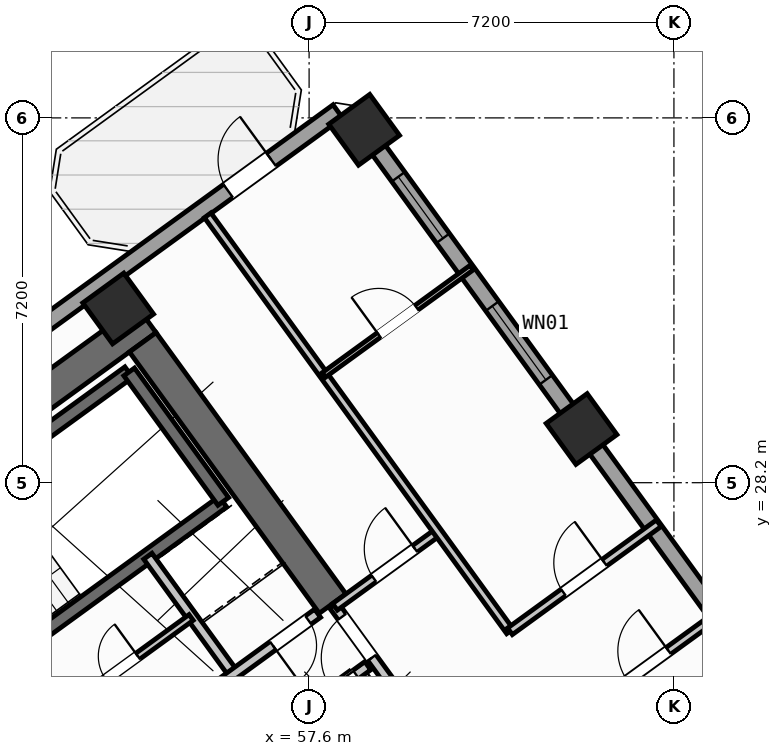
"""IFC4 building model, lengths in metres.
Left out: names, types, materials, properties, quantities, classifications, styles, units other than length and angle.
Written with IfcOpenShell. Run it as: python <this file> out.ifc"""

import sys

from ifc_helpers import new_model, si_unit, direction, frame, frame_2d, origin, origin_2d, place, context, subcontext, project, spatial, rectangle, hollow_rectangle, extrude, source, transform, mapped, element, fill, save


model = new_model("IFC4")
c1 = context("Model", 3, precision=1e-05, world=origin(), true_north=direction((0.0, 1.0)))
c2 = subcontext(c1, "Body", "Model", "MODEL_VIEW")
j1 = project(units=[si_unit("LENGTHUNIT", "METRE"), si_unit("PLANEANGLEUNIT", "RADIAN")], contexts=[c1])
p1 = place(None, origin())
s1 = spatial("IfcSite", under=j1, at=p1, CompositionType="ELEMENT")
p2 = place(p1, origin())
s2 = spatial("IfcBuilding", under=s1, at=p2, CompositionType="ELEMENT")
p3 = place(p2, frame((0.0, 0.0, 60.0)))
s3 = spatial("IfcBuildingStorey", under=s2, at=p3, CompositionType="ELEMENT", Elevation=60.0)
p4 = place(p3, frame((44.325, 24.113, 0.0), z_axis=(0.0, 0.0, 1.0), x_axis=(0.809012664862, 0.58779121131, 0.0)))
e1 = element("IfcWall", 1, at=p4, inside=s3, PredefinedType="SHEAR", context=c2, shape_type="SweptSolid", body=[
    extrude(rectangle(XDim=12.44, YDim=0.65, at=frame_2d((6.22, 0.0))), origin(), (0.0, 0.0, 1.0), 3.35),
])
p5 = place(p3, frame((58.064, 25.813, 0.0), z_axis=(0.0, 0.0, 1.0), x_axis=(-0.58777996584, 0.809020835181, 0.0)))
e2 = element("IfcWall", 2, at=p5, inside=s3, PredefinedType="SHEAR", context=c2, shape_type="SweptSolid", body=[
    extrude(rectangle(XDim=6.375, YDim=0.65, at=frame_2d((3.188, 0.0))), origin(), (0.0, 0.0, 1.0), 3.35),
])
m1 = source(origin(), c2, "Body", "SweptSolid", [
    extrude(hollow_rectangle(XDim=1.0, YDim=1.0, WallThickness=0.04, at=origin_2d()), origin(), (0.0, 0.0, 1.0), 3.6),
])
for number, where, z_axis, x_axis in (
    (3, (53.832, 31.638, 0.0), (0.0, 0.0, 1.0), (0.809, 0.588, 0.0)),
    (4, (62.977, 29.259, 0.0), (0.0, 0.0, 1.0), (0.809, 0.588, 0.0)),
    (5, (58.686, 35.165, 0.0), (0.0, 0.0, 1.0), (0.809, 0.588, 0.0)),
):
    element("IfcColumn", number, at=place(p3, frame(where, z_axis=z_axis, x_axis=x_axis)), inside=s3, PredefinedType="COLUMN", context=c2, shape_type="MappedRepresentation", body=[
        mapped(m1, transform((0.0, 0.0, 0.0), scale=1.0)),
    ])
p6 = place(p3, frame((43.938, 25.192, 0.0), z_axis=(0.0, 0.0, 1.0), x_axis=(0.809016324578, 0.587786174187, 0.0)))
e6 = element("IfcWall", 6, at=p6, inside=s3, PredefinedType="STANDARD", context=c2, shape_type="SweptSolid", body=[
    extrude(rectangle(XDim=17.587, YDim=0.32, at=frame_2d((8.794, 0.0))), origin(), (0.0, 0.0, 1.0), 3.35),
])
p7 = place(p6, frame((14.914, 0.0, 0.0)))
e7 = element("IfcOpeningElement", 7, at=p7, cuts=e6, PredefinedType="OPENING", context=c2, shape_type="SweptSolid", body=[
    extrude(rectangle(XDim=1.05, YDim=2.15, at=frame_2d((0.525, 1.075))), frame((0.0, 0.17, 0.0), z_axis=(0.0, -1.0, 0.0), x_axis=(1.0, 0.0, 0.0)), (0.0, 0.0, 1.0), 0.34),
])
p8 = place(p6, frame((2.169, 0.0, 0.8)))
e8 = element("IfcOpeningElement", 8, at=p8, cuts=e6, PredefinedType="OPENING", context=c2, shape_type="SweptSolid", body=[
    extrude(rectangle(XDim=2.1, YDim=1.55, at=frame_2d((1.05, 0.775))), frame((0.0, 0.17, 0.0), z_axis=(0.0, -1.0, 0.0), x_axis=(1.0, 0.0, 0.0)), (0.0, 0.0, 1.0), 0.34),
])
p9 = place(p6, frame((7.319, 0.0, 0.8)))
e9 = element("IfcOpeningElement", 9, at=p9, cuts=e6, PredefinedType="OPENING", context=c2, shape_type="SweptSolid", body=[
    extrude(rectangle(XDim=2.1, YDim=1.55, at=frame_2d((1.05, 0.775))), frame((0.0, 0.17, 0.0), z_axis=(0.0, -1.0, 0.0), x_axis=(1.0, 0.0, 0.0)), (0.0, 0.0, 1.0), 0.34),
])
p10 = place(p3, frame((58.455, 35.484, 0.0), z_axis=(0.0, 0.0, 1.0), x_axis=(0.587783625747, -0.809018176127, 0.0)))
e10 = element("IfcWall", 10, at=p10, inside=s3, PredefinedType="STANDARD", context=c2, shape_type="SweptSolid", body=[
    extrude(rectangle(XDim=21.587, YDim=0.32, at=frame_2d((10.794, 0.0))), origin(), (0.0, 0.0, 1.0), 2.725),
])
p11 = place(p10, frame((1.54, 0.0, 0.85)))
e11 = element("IfcOpeningElement", 11, at=p11, cuts=e10, PredefinedType="OPENING", context=c2, shape_type="SweptSolid", body=[
    extrude(rectangle(XDim=1.5, YDim=1.5, at=frame_2d((0.75, 0.75))), frame((0.0, 0.17, 0.0), z_axis=(0.0, -1.0, 0.0), x_axis=(1.0, 0.0, 0.0)), (0.0, 0.0, 1.0), 0.34),
])
p12 = place(p10, frame((4.695, 0.0, 0.85)))
e12 = element("IfcOpeningElement", 12, at=p12, cuts=e10, PredefinedType="OPENING", context=c2, shape_type="SweptSolid", body=[
    extrude(rectangle(XDim=1.8, YDim=1.5, at=frame_2d((0.9, 0.75))), frame((0.0, 0.17, 0.0), z_axis=(0.0, -1.0, 0.0), x_axis=(1.0, 0.0, 0.0)), (0.0, 0.0, 1.0), 0.34),
])
p13 = place(p10, frame((13.009, 0.0, 1.0)))
e13 = element("IfcOpeningElement", 13, at=p13, cuts=e10, PredefinedType="OPENING", context=c2, shape_type="SweptSolid", body=[
    extrude(rectangle(XDim=0.9, YDim=1.25, at=frame_2d((0.45, 0.625))), frame((0.0, 0.17, 0.0), z_axis=(0.0, -1.0, 0.0), x_axis=(1.0, 0.0, 0.0)), (0.0, 0.0, 1.0), 0.34),
])
p14 = place(p10, frame((16.092, 0.0, 0.95)))
e14 = element("IfcOpeningElement", 14, at=p14, cuts=e10, PredefinedType="OPENING", context=c2, shape_type="SweptSolid", body=[
    extrude(rectangle(XDim=1.2, YDim=1.4, at=frame_2d((0.6, 0.7))), frame((0.0, 0.17, 0.0), z_axis=(0.0, -1.0, 0.0), x_axis=(1.0, 0.0, 0.0)), (0.0, 0.0, 1.0), 0.34),
])
p15 = place(p10, frame((19.085, 0.0, 1.0)))
e15 = element("IfcOpeningElement", 15, at=p15, cuts=e10, PredefinedType="OPENING", context=c2, shape_type="SweptSolid", body=[
    extrude(rectangle(XDim=0.9, YDim=1.25, at=frame_2d((0.45, 0.625))), frame((0.0, 0.17, 0.0), z_axis=(0.0, -1.0, 0.0), x_axis=(1.0, 0.0, 0.0)), (0.0, 0.0, 1.0), 0.34),
])
p16 = place(p3, frame((48.006, 25.996, 0.0), z_axis=(0.0, 0.0, 1.0), x_axis=(0.80901903764, 0.587782439969, 0.0)))
e16 = element("IfcWall", 16, at=p16, inside=s3, PredefinedType="SHEAR", context=c2, shape_type="SweptSolid", body=[
    extrude(rectangle(XDim=7.46, YDim=0.26, at=frame_2d((3.73, 0.0))), origin(), (0.0, 0.0, 1.0), 3.35),
])
p17 = place(p3, frame((49.863, 23.44, 0.0), z_axis=(0.0, 0.0, 1.0), x_axis=(0.809003474932, 0.587803859759, 0.0)))
e17 = element("IfcWall", 17, at=p17, inside=s3, PredefinedType="SHEAR", context=c2, shape_type="SweptSolid", body=[
    extrude(rectangle(XDim=7.46, YDim=0.26, at=frame_2d((3.73, 0.0))), origin(), (0.0, 0.0, 1.0), 3.35),
])
p18 = place(p17, frame((0.36, 0.0, 0.0)))
e18 = element("IfcOpeningElement", 18, at=p18, cuts=e17, PredefinedType="OPENING", context=c2, shape_type="SweptSolid", body=[
    extrude(rectangle(XDim=0.86, YDim=2.05, at=frame_2d((0.43, 1.025))), frame((0.0, 0.14, 0.0), z_axis=(0.0, -1.0, 0.0), x_axis=(1.0, 0.0, 0.0)), (0.0, 0.0, 1.0), 0.28),
])
p19 = place(p3, frame((55.906, 27.831, 0.0), z_axis=(0.0, 0.0, 1.0), x_axis=(-0.587804123638, 0.809003283204, 0.0)))
e19 = element("IfcWall", 19, at=p19, inside=s3, PredefinedType="SHEAR", context=c2, shape_type="SweptSolid", body=[
    extrude(rectangle(XDim=3.16, YDim=0.26, at=frame_2d((1.58, 0.0))), origin(), (0.0, 0.0, 1.0), 3.35),
])
p20 = place(p3, frame((54.421, 21.436, 0.0), z_axis=(0.0, 0.0, 1.0), x_axis=(0.809013710463, 0.587789772183, 0.0)))
e20 = element("IfcWall", 20, at=p20, inside=s3, PredefinedType="STANDARD", context=c2, shape_type="SweptSolid", body=[
    extrude(rectangle(XDim=5.36, YDim=0.2, at=frame_2d((2.68, 0.0))), origin(), (0.0, 0.0, 1.0), 3.34),
])
p21 = place(p20, frame((0.37, 0.0, 0.0)))
e21 = element("IfcOpeningElement", 21, at=p21, cuts=e20, PredefinedType="OPENING", context=c2, shape_type="SweptSolid", body=[
    extrude(rectangle(XDim=1.1, YDim=2.15, at=frame_2d((0.55, 1.075))), frame((0.0, 0.11, 0.0), z_axis=(0.0, -1.0, 0.0), x_axis=(1.0, 0.0, 0.0)), (0.0, 0.0, 1.0), 0.22),
])
p22 = place(p20, frame((2.17, 0.0, 0.0)))
e22 = element("IfcOpeningElement", 22, at=p22, cuts=e20, PredefinedType="OPENING", context=c2, shape_type="SweptSolid", body=[
    extrude(rectangle(XDim=1.1, YDim=2.15, at=frame_2d((0.55, 1.075))), frame((0.0, 0.11, 0.0), z_axis=(0.0, -1.0, 0.0), x_axis=(1.0, 0.0, 0.0)), (0.0, 0.0, 1.0), 0.22),
])
p23 = place(p20, frame((3.97, 0.0, 0.0)))
e23 = element("IfcOpeningElement", 23, at=p23, cuts=e20, PredefinedType="OPENING", context=c2, shape_type="SweptSolid", body=[
    extrude(rectangle(XDim=1.1, YDim=2.15, at=frame_2d((0.55, 1.075))), frame((0.0, 0.11, 0.0), z_axis=(0.0, -1.0, 0.0), x_axis=(1.0, 0.0, 0.0)), (0.0, 0.0, 1.0), 0.22),
])
p24 = place(p3, frame((53.425, 22.468, 0.0), z_axis=(0.0, 0.0, 1.0), x_axis=(-0.5877230039, 0.809062216821, 0.0)))
e24 = element("IfcWall", 24, at=p24, inside=s3, PredefinedType="STANDARD", context=c2, shape_type="SweptSolid", body=[
    extrude(rectangle(XDim=2.88, YDim=0.2, at=frame_2d((1.44, 0.0))), origin(), (0.0, 0.0, 1.0), 3.34),
])
p25 = place(p3, frame((56.111, 24.419, 0.0), z_axis=(0.0, 0.0, 1.0), x_axis=(-0.58777848983, 0.809021907548, 0.0)))
e25 = element("IfcWall", 25, at=p25, inside=s3, PredefinedType="STANDARD", context=c2, shape_type="SweptSolid", body=[
    extrude(rectangle(XDim=2.88, YDim=0.2, at=frame_2d((1.44, 0.0))), origin(), (0.0, 0.0, 1.0), 3.34),
])
p26 = place(p3, frame((53.425, 22.468, 0.0), z_axis=(0.0, 0.0, 1.0), x_axis=(0.80902705128, 0.587771409902, 0.0)))
e26 = element("IfcWall", 26, at=p26, inside=s3, PredefinedType="STANDARD", context=c2, shape_type="SweptSolid", body=[
    extrude(rectangle(XDim=5.368, YDim=0.2, at=frame_2d((2.684, 0.0))), origin(), (0.0, 0.0, 1.0), 3.34),
])
p27 = place(p26, frame((4.28, 0.0, 0.0)))
e27 = element("IfcOpeningElement", 27, at=p27, cuts=e26, PredefinedType="OPENING", context=c2, shape_type="SweptSolid", body=[
    extrude(rectangle(XDim=0.86, YDim=2.05, at=frame_2d((0.43, 1.025))), frame((0.0, 0.11, 0.0), z_axis=(0.0, -1.0, 0.0), x_axis=(1.0, 0.0, 0.0)), (0.0, 0.0, 1.0), 0.22),
])
p28 = place(p26, frame((1.45, 0.0, 0.0)))
e28 = element("IfcOpeningElement", 28, at=p28, cuts=e26, PredefinedType="OPENING", context=c2, shape_type="SweptSolid", body=[
    extrude(rectangle(XDim=0.86, YDim=2.05, at=frame_2d((0.43, 1.025))), frame((0.0, 0.11, 0.0), z_axis=(0.0, -1.0, 0.0), x_axis=(1.0, 0.0, 0.0)), (0.0, 0.0, 1.0), 0.22),
])
p29 = place(p3, frame((52.618, 23.612, 0.0), z_axis=(0.0, 0.0, 1.0), x_axis=(0.809009587469, 0.587795446889, 0.0)))
e29 = element("IfcWall", 29, at=p29, inside=s3, PredefinedType="PLUMBINGWALL", context=c2, shape_type="SweptSolid", body=[
    extrude(rectangle(XDim=3.28, YDim=0.14, at=frame_2d((1.64, 0.0))), origin(), (0.0, 0.0, 1.0), 3.34),
])
p30 = place(p29, frame((1.2, 0.0, 0.0)))
e30 = element("IfcOpeningElement", 30, at=p30, cuts=e29, PredefinedType="OPENING", context=c2, shape_type="SweptSolid", body=[
    extrude(rectangle(XDim=0.78, YDim=2.05, at=frame_2d((0.39, 1.025))), frame((0.0, 0.08, 0.0), z_axis=(0.0, -1.0, 0.0), x_axis=(1.0, 0.0, 0.0)), (0.0, 0.0, 1.0), 0.16),
])
p31 = place(p3, frame((59.827, 23.386, 0.0), z_axis=(0.0, 0.0, 1.0), x_axis=(-0.587803840107, 0.809003489211, 0.0)))
e31 = element("IfcWall", 31, at=p31, inside=s3, PredefinedType="STANDARD", context=c2, shape_type="SweptSolid", body=[
    extrude(rectangle(XDim=2.96, YDim=0.2, at=frame_2d((1.48, 0.0))), origin(), (0.0, 0.0, 1.0), 3.34),
])
p32 = place(p31, frame((1.68, 0.0, 0.0)))
e32 = element("IfcOpeningElement", 32, at=p32, cuts=e31, PredefinedType="OPENING", context=c2, shape_type="SweptSolid", body=[
    extrude(rectangle(XDim=1.0, YDim=2.1, at=frame_2d((0.5, 1.05))), frame((0.0, 0.11, 0.0), z_axis=(0.0, -1.0, 0.0), x_axis=(1.0, 0.0, 0.0)), (0.0, 0.0, 1.0), 0.22),
])
p33 = place(p3, frame((58.111, 25.749, 0.0), z_axis=(0.0, 0.0, 1.0), x_axis=(0.809000999347, 0.58780726693, 0.0)))
e33 = element("IfcWall", 33, at=p33, inside=s3, PredefinedType="PARTITIONING", context=c2, shape_type="SweptSolid", body=[
    extrude(rectangle(XDim=2.51, YDim=0.16, at=frame_2d((1.255, 0.0))), origin(), (0.0, 0.0, 1.0), 2.725),
])
p34 = place(p33, frame((0.95, 0.0, 0.0)))
e34 = element("IfcOpeningElement", 34, at=p34, cuts=e33, PredefinedType="OPENING", context=c2, shape_type="SweptSolid", body=[
    extrude(rectangle(XDim=1.0, YDim=2.1, at=frame_2d((0.5, 1.05))), frame((0.0, 0.09, 0.0), z_axis=(0.0, -1.0, 0.0), x_axis=(1.0, 0.0, 0.0)), (0.0, 0.0, 1.0), 0.18),
])
p35 = place(p3, frame((61.564, 25.266, 0.0), z_axis=(0.0, 0.0, 1.0), x_axis=(-0.587792629712, 0.809011634314, 0.0)))
e35 = element("IfcWall", 35, at=p35, inside=s3, PredefinedType="PARTITIONING", context=c2, shape_type="SweptSolid", body=[
    extrude(rectangle(XDim=10.15, YDim=0.16, at=frame_2d((5.075, 0.0))), origin(), (0.0, 0.0, 1.0), 3.34),
])
p36 = place(p3, frame((62.828, 23.527, 0.0), z_axis=(0.0, 0.0, 1.0), x_axis=(0.809003564202, 0.587803736896, 0.0)))
e36 = element("IfcWall", 36, at=p36, inside=s3, PredefinedType="PARTITIONING", context=c2, shape_type="SweptSolid", body=[
    extrude(rectangle(XDim=3.63, YDim=0.16, at=frame_2d((1.815, 0.0))), origin(), (0.0, 0.0, 1.0), 3.34),
])
p37 = place(p36, frame((1.305, 0.0, 0.0)))
e37 = element("IfcOpeningElement", 37, at=p37, cuts=e36, PredefinedType="OPENING", context=c2, shape_type="SweptSolid", body=[
    extrude(rectangle(XDim=1.0, YDim=2.1, at=frame_2d((0.5, 1.05))), frame((0.0, 0.09, 0.0), z_axis=(0.0, -1.0, 0.0), x_axis=(1.0, 0.0, 0.0)), (0.0, 0.0, 1.0), 0.18),
])
p38 = place(p3, frame((61.564, 25.266, 0.0), z_axis=(0.0, 0.0, 1.0), x_axis=(0.809012309495, 0.587791700422, 0.0)))
e38 = element("IfcWall", 38, at=p38, inside=s3, PredefinedType="PARTITIONING", context=c2, shape_type="SweptSolid", body=[
    extrude(rectangle(XDim=3.63, YDim=0.16, at=frame_2d((1.815, 0.0))), origin(), (0.0, 0.0, 1.0), 3.34),
])
p39 = place(p38, frame((1.305, 0.0, 0.0)))
e39 = element("IfcOpeningElement", 39, at=p39, cuts=e38, PredefinedType="OPENING", context=c2, shape_type="SweptSolid", body=[
    extrude(rectangle(XDim=1.0, YDim=2.1, at=frame_2d((0.5, 1.05))), frame((0.0, 0.09, 0.0), z_axis=(0.0, -1.0, 0.0), x_axis=(1.0, 0.0, 0.0)), (0.0, 0.0, 1.0), 0.18),
])
p40 = place(p3, frame((57.889, 30.324, 0.0), z_axis=(0.0, 0.0, 1.0), x_axis=(0.809005039917, 0.58780170584, 0.0)))
e40 = element("IfcWall", 40, at=p40, inside=s3, PredefinedType="PARTITIONING", context=c2, shape_type="SweptSolid", body=[
    extrude(rectangle(XDim=3.61, YDim=0.11, at=frame_2d((1.805, 0.0))), origin(), (0.0, 0.0, 1.0), 3.34),
])
p41 = place(p40, frame((1.345, 0.0, 0.0)))
e41 = element("IfcOpeningElement", 41, at=p41, cuts=e40, PredefinedType="OPENING", context=c2, shape_type="SweptSolid", body=[
    extrude(rectangle(XDim=0.92, YDim=2.08, at=frame_2d((0.46, 1.04))), frame((0.0, 0.065, 0.0), z_axis=(0.0, -1.0, 0.0), x_axis=(1.0, 0.0, 0.0)), (0.0, 0.0, 1.0), 0.13),
])
m2 = source(origin(), c2, "Body", "SweptSolid", [
    extrude(rectangle(XDim=1.05, YDim=2.15, at=frame_2d((0.525, 1.075))), frame((0.0, 0.025, 0.0), z_axis=(0.0, -1.0, 0.0), x_axis=(1.0, 0.0, 0.0)), (0.0, 0.0, 1.0), 0.05),
])
p42 = place(p7, origin())
e42 = element("IfcDoor", 42, at=p42, inside=s3, OperationType="SINGLE_SWING_RIGHT", PredefinedType="DOOR", context=c2, shape_type="MappedRepresentation", body=[
    mapped(m2, transform((0.0, 0.0, 0.0), scale=1.0)),
])
fill(e7, e42)
m3 = source(origin(), c2, "Body", "SweptSolid", [
    extrude(rectangle(XDim=1.5, YDim=1.5, at=frame_2d((0.75, 0.75))), frame((0.0, 0.03, 0.0), z_axis=(0.0, -1.0, 0.0), x_axis=(1.0, 0.0, 0.0)), (0.0, 0.0, 1.0), 0.06),
])
p43 = place(p11, origin())
e43 = element("IfcWindow", 43, at=p43, inside=s3, PartitioningType="SINGLE_PANEL", PredefinedType="WINDOW", context=c2, shape_type="MappedRepresentation", body=[
    mapped(m3, transform((0.0, 0.0, 0.0), scale=1.0)),
])
fill(e11, e43)
m4 = source(origin(), c2, "Body", "SweptSolid", [
    extrude(rectangle(XDim=1.8, YDim=1.5, at=frame_2d((0.9, 0.75))), frame((0.0, 0.03, 0.0), z_axis=(0.0, -1.0, 0.0), x_axis=(1.0, 0.0, 0.0)), (0.0, 0.0, 1.0), 0.06),
])
p44 = place(p12, origin())
e44 = element("IfcWindow", 44, at=p44, inside=s3, PartitioningType="SINGLE_PANEL", PredefinedType="WINDOW", context=c2, shape_type="MappedRepresentation", body=[
    mapped(m4, transform((0.0, 0.0, 0.0), scale=1.0)),
])
fill(e12, e44)
m5 = source(origin(), c2, "Body", "SweptSolid", [
    extrude(rectangle(XDim=1.1, YDim=2.15, at=frame_2d((0.55, 1.075))), frame((0.0, 0.025, 0.0), z_axis=(0.0, -1.0, 0.0), x_axis=(1.0, 0.0, 0.0)), (0.0, 0.0, 1.0), 0.05),
])
p45 = place(p23, origin())
e45 = element("IfcDoor", 45, at=p45, inside=s3, OperationType="DOUBLE_DOOR_SLIDING", PredefinedType="DOOR", context=c2, shape_type="MappedRepresentation", body=[
    mapped(m5, transform((0.0, 0.0, 0.0), scale=1.0)),
])
fill(e23, e45)
m6 = source(origin(), c2, "Body", "SweptSolid", [
    extrude(rectangle(XDim=0.86, YDim=2.05, at=frame_2d((0.43, 1.025))), frame((0.0, 0.025, 0.0), z_axis=(0.0, -1.0, 0.0), x_axis=(1.0, 0.0, 0.0)), (0.0, 0.0, 1.0), 0.05),
])
p46 = place(p27, frame((0.86, 0.0, 0.0), z_axis=(0.0, 0.0, 1.0), x_axis=(-1.0, 0.0, 0.0)))
e46 = element("IfcDoor", 46, at=p46, inside=s3, OperationType="SINGLE_SWING_RIGHT", PredefinedType="DOOR", context=c2, shape_type="MappedRepresentation", body=[
    mapped(m6, transform((0.0, 0.0, 0.0), scale=1.0)),
])
fill(e27, e46)
m7 = source(origin(), c2, "Body", "SweptSolid", [
    extrude(rectangle(XDim=0.78, YDim=2.05, at=frame_2d((0.39, 1.025))), frame((0.0, 0.025, 0.0), z_axis=(0.0, -1.0, 0.0), x_axis=(1.0, 0.0, 0.0)), (0.0, 0.0, 1.0), 0.05),
])
p47 = place(p30, origin())
e47 = element("IfcDoor", 47, at=p47, inside=s3, OperationType="SINGLE_SWING_RIGHT", PredefinedType="DOOR", context=c2, shape_type="MappedRepresentation", body=[
    mapped(m7, transform((0.0, 0.0, 0.0), scale=1.0)),
])
fill(e30, e47)
m8 = source(origin(), c2, "Body", "SweptSolid", [
    extrude(rectangle(XDim=1.0, YDim=2.1, at=frame_2d((0.5, 1.05))), frame((0.0, 0.025, 0.0), z_axis=(0.0, -1.0, 0.0), x_axis=(1.0, 0.0, 0.0)), (0.0, 0.0, 1.0), 0.05),
])
p48 = place(p34, origin())
e48 = element("IfcDoor", 48, at=p48, inside=s3, OperationType="SINGLE_SWING_RIGHT", PredefinedType="DOOR", context=c2, shape_type="MappedRepresentation", body=[
    mapped(m8, transform((0.0, 0.0, 0.0), scale=1.0)),
])
fill(e34, e48)
p49 = place(p32, origin())
e49 = element("IfcDoor", 49, at=p49, inside=s3, OperationType="SINGLE_SWING_LEFT", PredefinedType="DOOR", context=c2, shape_type="MappedRepresentation", body=[
    mapped(m8, transform((0.0, 0.0, 0.0), scale=1.0)),
])
fill(e32, e49)
p50 = place(p39, origin())
e50 = element("IfcDoor", 50, at=p50, inside=s3, OperationType="SINGLE_SWING_RIGHT", PredefinedType="DOOR", context=c2, shape_type="MappedRepresentation", body=[
    mapped(m8, transform((0.0, 0.0, 0.0), scale=1.0)),
])
fill(e39, e50)
m9 = source(origin(), c2, "Body", "SweptSolid", [
    extrude(rectangle(XDim=0.92, YDim=2.08, at=frame_2d((0.46, 1.04))), frame((0.0, 0.025, 0.0), z_axis=(0.0, -1.0, 0.0), x_axis=(1.0, 0.0, 0.0)), (0.0, 0.0, 1.0), 0.05),
])
p51 = place(p41, origin())
e51 = element("IfcDoor", 51, at=p51, inside=s3, OperationType="SINGLE_SWING_LEFT", PredefinedType="DOOR", context=c2, shape_type="MappedRepresentation", body=[
    mapped(m9, transform((0.0, 0.0, 0.0), scale=1.0)),
])
fill(e41, e51)
p52 = place(p37, origin())
e52 = element("IfcDoor", 52, at=p52, inside=s3, OperationType="SINGLE_SWING_RIGHT", PredefinedType="DOOR", context=c2, shape_type="MappedRepresentation", body=[
    mapped(m8, transform((0.0, 0.0, 0.0), scale=1.0)),
])
fill(e37, e52)
save(model, sys.argv[1])
